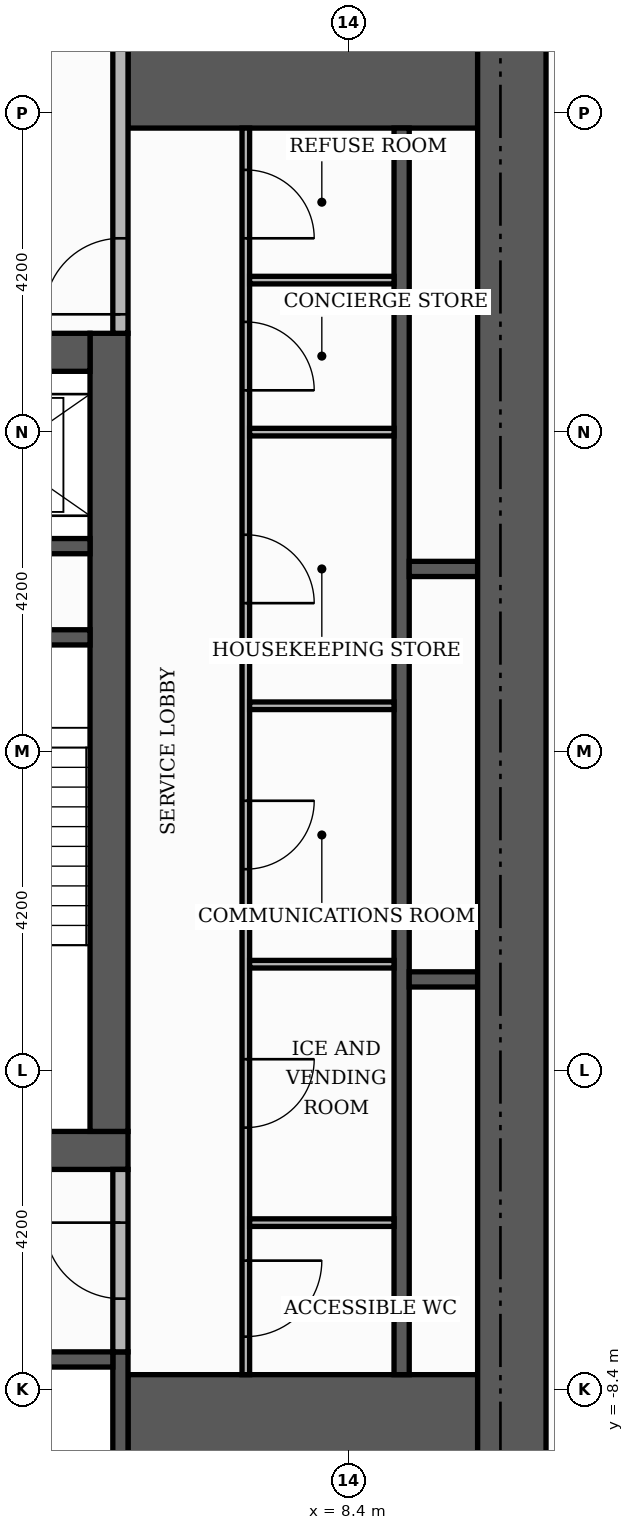
"""IFC4 building model, lengths in metres.
Left out: names, types, materials, properties, quantities, classifications, styles, units other than length and angle.
Written with IfcOpenShell. Run it as: python <this file> out.ifc"""

import sys

from ifc_helpers import new_model, si_unit, direction, frame, frame_2d, origin, place, context, subcontext, project, spatial, rectangle, extrude, element, fill, save


model = new_model("IFC4")
c1 = context("Model", 3, precision=1e-05, world=origin(), true_north=direction((0.0, 1.0)))
c2 = subcontext(c1, "Body", "Model", "MODEL_VIEW")
j1 = project(units=[si_unit("LENGTHUNIT", "METRE"), si_unit("PLANEANGLEUNIT", "RADIAN")], contexts=[c1])
p1 = place(None, origin())
s1 = spatial("IfcSite", under=j1, at=p1, CompositionType="ELEMENT")
p2 = place(p1, origin())
s2 = spatial("IfcBuilding", under=s1, at=p2, CompositionType="ELEMENT")
p3 = place(p2, frame((0.0, 0.0, 102.6)))
s3 = spatial("IfcBuildingStorey", under=s2, at=p3, CompositionType="ELEMENT", Elevation=102.6)
p4 = place(p3, frame((-5.5, -5.25, 0.0), z_axis=(0.0, 0.0, 1.0), x_axis=(1.0, 0.0, 0.0)))
e1 = element("IfcWall", 1, at=p4, inside=s3, PredefinedType="SHEAR", context=c2, shape_type="SweptSolid", body=[
    extrude(rectangle(XDim=11.0, YDim=0.5, at=frame_2d((5.5, 0.0))), origin(), (0.0, 0.0, 1.0), 3.48),
])
p5 = place(p4, frame((4.9, 0.0, 0.0)))
e2 = element("IfcOpeningElement", 2, at=p5, cuts=e1, PredefinedType="OPENING", context=c2, shape_type="SweptSolid", body=[
    extrude(rectangle(XDim=1.2, YDim=2.1, at=frame_2d((0.6, 1.05))), frame((0.0, 0.26, 0.0), z_axis=(0.0, -1.0, 0.0), x_axis=(1.0, 0.0, 0.0)), (0.0, 0.0, 1.0), 0.52),
])
p6 = place(p3, frame((5.25, -5.0, 0.0), z_axis=(0.0, 0.0, 1.0), x_axis=(0.0, 1.0, 0.0)))
e3 = element("IfcWall", 3, at=p6, inside=s3, PredefinedType="SHEAR", context=c2, shape_type="SweptSolid", body=[
    extrude(rectangle(XDim=10.5, YDim=0.5, at=frame_2d((5.25, 0.0))), origin(), (0.0, 0.0, 1.0), 3.48),
])
p7 = place(p3, frame((-5.0, 5.25, 0.0), z_axis=(0.0, 0.0, 1.0), x_axis=(1.0, 0.0, 0.0)))
e4 = element("IfcWall", 4, at=p7, inside=s3, PredefinedType="SHEAR", context=c2, shape_type="SweptSolid", body=[
    extrude(rectangle(XDim=10.0, YDim=0.5, at=frame_2d((5.0, 0.0))), origin(), (0.0, 0.0, 1.0), 3.48),
])
p8 = place(p7, frame((4.4, 0.0, 0.0)))
e5 = element("IfcOpeningElement", 5, at=p8, cuts=e4, PredefinedType="OPENING", context=c2, shape_type="SweptSolid", body=[
    extrude(rectangle(XDim=1.2, YDim=2.1, at=frame_2d((0.6, 1.05))), frame((0.0, 0.26, 0.0), z_axis=(0.0, -1.0, 0.0), x_axis=(1.0, 0.0, 0.0)), (0.0, 0.0, 1.0), 0.52),
])
for number, where, z_axis, x_axis in (
    (6, (5.5, -9.15, 0.0), (0.0, 0.0, 1.0), (1.0, 0.0, 0.0)),
    (7, (5.5, 9.15, 0.0), (0.0, 0.0, 1.0), (1.0, 0.0, 0.0)),
):
    element("IfcWall", number, at=place(p3, frame(where, z_axis=z_axis, x_axis=x_axis)), inside=s3, PredefinedType="SHEAR", context=c2, shape_type="SweptSolid", body=[
        extrude(rectangle(XDim=4.6, YDim=1.9, at=frame_2d((2.3, 0.0))), origin(), (0.0, 0.0, 1.0), 3.48),
    ])
p9 = place(p3, frame((2.15, 1.5, 0.0), z_axis=(0.0, 0.0, 1.0), x_axis=(1.0, 0.0, 0.0)))
e8 = element("IfcWall", 8, at=p9, inside=s3, PredefinedType="SHEAR", context=c2, shape_type="SweptSolid", body=[
    extrude(rectangle(XDim=2.85, YDim=0.2, at=frame_2d((1.425, 0.0))), origin(), (0.0, 0.0, 1.0), 3.48),
])
p10 = place(p3, frame((5.4, -10.1, 0.0), z_axis=(0.0, 0.0, 1.0), x_axis=(0.0, 1.0, 0.0)))
e9 = element("IfcWall", 9, at=p10, inside=s3, PredefinedType="SHEAR", context=c2, shape_type="SweptSolid", body=[
    extrude(rectangle(XDim=2.2, YDim=0.2, at=frame_2d((1.1, 0.0))), origin(), (0.0, 0.0, 1.0), 3.48),
])
p11 = place(p3, frame((9.1, -8.2, 0.0), z_axis=(0.0, 0.0, 1.0), x_axis=(0.0, 1.0, 0.0)))
e10 = element("IfcWall", 10, at=p11, inside=s3, PredefinedType="SHEAR", context=c2, shape_type="SweptSolid", body=[
    extrude(rectangle(XDim=16.4, YDim=0.2, at=frame_2d((8.2, 0.0))), origin(), (0.0, 0.0, 1.0), 3.48),
])
p12 = place(p3, frame((2.8, -8.0, 0.0), z_axis=(0.0, 0.0, 1.0), x_axis=(1.0, 0.0, 0.0)))
e11 = element("IfcWall", 11, at=p12, inside=s3, PredefinedType="SHEAR", context=c2, shape_type="SweptSolid", body=[
    extrude(rectangle(XDim=2.5, YDim=0.2, at=frame_2d((1.25, 0.0))), origin(), (0.0, 0.0, 1.0), 3.48),
])
for number, where, z_axis, x_axis in (
    (12, (9.2, -3.0, 0.0), (0.0, 0.0, 1.0), (1.0, 0.0, 0.0)),
    (13, (9.2, 2.4, 0.0), (0.0, 0.0, 1.0), (1.0, 0.0, 0.0)),
):
    element("IfcWall", number, at=place(p3, frame(where, z_axis=z_axis, x_axis=x_axis)), inside=s3, PredefinedType="SHEAR", context=c2, shape_type="SweptSolid", body=[
        extrude(rectangle(XDim=0.9, YDim=0.2, at=frame_2d((0.45, 0.0))), origin(), (0.0, 0.0, 1.0), 3.48),
    ])
p13 = place(p3, frame((2.15, 2.7, 0.0), z_axis=(0.0, 0.0, 1.0), x_axis=(1.0, 0.0, 0.0)))
e14 = element("IfcWall", 14, at=p13, inside=s3, PredefinedType="SHEAR", context=c2, shape_type="SweptSolid", body=[
    extrude(rectangle(XDim=2.85, YDim=0.2, at=frame_2d((1.425, 0.0))), origin(), (0.0, 0.0, 1.0), 3.48),
])
p14 = place(p3, frame((10.55, -10.1, 0.0), z_axis=(0.0, 0.0, 1.0), x_axis=(0.0, 1.0, 0.0)))
e15 = element("IfcWall", 15, at=p14, inside=s3, PredefinedType="SHEAR", context=c2, shape_type="SweptSolid", body=[
    extrude(rectangle(XDim=20.2, YDim=0.9, at=frame_2d((10.1, 0.0))), origin(), (0.0, 0.0, 1.0), 3.48),
])
p15 = place(p3, frame((7.05, -8.2, 0.0), z_axis=(0.0, 0.0, 1.0), x_axis=(0.0, 1.0, 0.0)))
e16 = element("IfcWall", 16, at=p15, inside=s3, PredefinedType="PARTITIONING", context=c2, shape_type="SweptSolid", body=[
    extrude(rectangle(XDim=16.4, YDim=0.1, at=frame_2d((8.2, 0.0))), origin(), (0.0, 0.0, 1.0), 3.48),
])
p16 = place(p15, frame((0.5, 0.0, 0.0)))
e17 = element("IfcOpeningElement", 17, at=p16, cuts=e16, PredefinedType="OPENING", context=c2, shape_type="SweptSolid", body=[
    extrude(rectangle(XDim=1.0, YDim=2.1, at=frame_2d((0.5, 1.05))), frame((0.0, 0.06, 0.0), z_axis=(0.0, -1.0, 0.0), x_axis=(1.0, 0.0, 0.0)), (0.0, 0.0, 1.0), 0.12),
])
p17 = place(p15, frame((3.25, 0.0, 0.0)))
e18 = element("IfcOpeningElement", 18, at=p17, cuts=e16, PredefinedType="OPENING", context=c2, shape_type="SweptSolid", body=[
    extrude(rectangle(XDim=0.9, YDim=2.1, at=frame_2d((0.45, 1.05))), frame((0.0, 0.06, 0.0), z_axis=(0.0, -1.0, 0.0), x_axis=(1.0, 0.0, 0.0)), (0.0, 0.0, 1.0), 0.12),
])
p18 = place(p15, frame((6.65, 0.0, 0.0)))
e19 = element("IfcOpeningElement", 19, at=p18, cuts=e16, PredefinedType="OPENING", context=c2, shape_type="SweptSolid", body=[
    extrude(rectangle(XDim=0.9, YDim=2.1, at=frame_2d((0.45, 1.05))), frame((0.0, 0.06, 0.0), z_axis=(0.0, -1.0, 0.0), x_axis=(1.0, 0.0, 0.0)), (0.0, 0.0, 1.0), 0.12),
])
p19 = place(p15, frame((10.15, 0.0, 0.0)))
e20 = element("IfcOpeningElement", 20, at=p19, cuts=e16, PredefinedType="OPENING", context=c2, shape_type="SweptSolid", body=[
    extrude(rectangle(XDim=0.9, YDim=2.1, at=frame_2d((0.45, 1.05))), frame((0.0, 0.06, 0.0), z_axis=(0.0, -1.0, 0.0), x_axis=(1.0, 0.0, 0.0)), (0.0, 0.0, 1.0), 0.12),
])
p20 = place(p15, frame((12.95, 0.0, 0.0)))
e21 = element("IfcOpeningElement", 21, at=p20, cuts=e16, PredefinedType="OPENING", context=c2, shape_type="SweptSolid", body=[
    extrude(rectangle(XDim=0.9, YDim=2.1, at=frame_2d((0.45, 1.05))), frame((0.0, 0.06, 0.0), z_axis=(0.0, -1.0, 0.0), x_axis=(1.0, 0.0, 0.0)), (0.0, 0.0, 1.0), 0.12),
])
p21 = place(p15, frame((14.95, 0.0, 0.0)))
e22 = element("IfcOpeningElement", 22, at=p21, cuts=e16, PredefinedType="OPENING", context=c2, shape_type="SweptSolid", body=[
    extrude(rectangle(XDim=0.9, YDim=2.1, at=frame_2d((0.45, 1.05))), frame((0.0, 0.06, 0.0), z_axis=(0.0, -1.0, 0.0), x_axis=(1.0, 0.0, 0.0)), (0.0, 0.0, 1.0), 0.12),
])
p22 = place(p3, frame((5.4, -7.9, 0.0), z_axis=(0.0, 0.0, 1.0), x_axis=(0.0, 1.0, 0.0)))
e23 = element("IfcWall", 23, at=p22, inside=s3, PredefinedType="PARTITIONING", context=c2, shape_type="SweptSolid", body=[
    extrude(rectangle(XDim=2.4, YDim=0.2, at=frame_2d((1.2, 0.0))), origin(), (0.0, 0.0, 1.0), 3.48),
])
p23 = place(p22, frame((0.7, 0.0, 0.0)))
e24 = element("IfcOpeningElement", 24, at=p23, cuts=e23, PredefinedType="OPENING", context=c2, shape_type="SweptSolid", body=[
    extrude(rectangle(XDim=1.0, YDim=2.1, at=frame_2d((0.5, 1.05))), frame((0.0, 0.11, 0.0), z_axis=(0.0, -1.0, 0.0), x_axis=(1.0, 0.0, 0.0)), (0.0, 0.0, 1.0), 0.22),
])
for number, where, z_axis, x_axis in (
    (25, (7.1, -6.2, 0.0), (0.0, 0.0, 1.0), (1.0, 0.0, 0.0)),
    (26, (7.1, -2.8, 0.0), (0.0, 0.0, 1.0), (1.0, 0.0, 0.0)),
    (27, (7.1, 0.6, 0.0), (0.0, 0.0, 1.0), (1.0, 0.0, 0.0)),
    (28, (7.1, 4.2, 0.0), (0.0, 0.0, 1.0), (1.0, 0.0, 0.0)),
):
    element("IfcWall", number, at=place(p3, frame(where, z_axis=z_axis, x_axis=x_axis)), inside=s3, PredefinedType="PARTITIONING", context=c2, shape_type="SweptSolid", body=[
        extrude(rectangle(XDim=1.9, YDim=0.1, at=frame_2d((0.95, 0.0))), origin(), (0.0, 0.0, 1.0), 3.48),
    ])
p24 = place(p3, frame((5.4, 5.5, 0.0), z_axis=(0.0, 0.0, 1.0), x_axis=(0.0, 1.0, 0.0)))
e29 = element("IfcWall", 29, at=p24, inside=s3, PredefinedType="PARTITIONING", context=c2, shape_type="SweptSolid", body=[
    extrude(rectangle(XDim=4.6, YDim=0.2, at=frame_2d((2.3, 0.0))), origin(), (0.0, 0.0, 1.0), 3.48),
])
p25 = place(p24, frame((0.25, 0.0, 0.0)))
e30 = element("IfcOpeningElement", 30, at=p25, cuts=e29, PredefinedType="OPENING", context=c2, shape_type="SweptSolid", body=[
    extrude(rectangle(XDim=1.0, YDim=2.1, at=frame_2d((0.5, 1.05))), frame((0.0, 0.11, 0.0), z_axis=(0.0, -1.0, 0.0), x_axis=(1.0, 0.0, 0.0)), (0.0, 0.0, 1.0), 0.22),
])
p26 = place(p3, frame((7.1, 6.2, 0.0), z_axis=(0.0, 0.0, 1.0), x_axis=(1.0, 0.0, 0.0)))
e31 = element("IfcWall", 31, at=p26, inside=s3, PredefinedType="PARTITIONING", context=c2, shape_type="SweptSolid", body=[
    extrude(rectangle(XDim=1.9, YDim=0.1, at=frame_2d((0.95, 0.0))), origin(), (0.0, 0.0, 1.0), 3.48),
])
p27 = place(p25, origin())
e32 = element("IfcDoor", 32, at=p27, inside=s3, OperationType="SINGLE_SWING_LEFT", PredefinedType="DOOR", context=c2, shape_type="SweptSolid", body=[
    extrude(rectangle(XDim=1.0, YDim=2.1, at=frame_2d((0.5, 1.05))), frame((0.0, 0.025, 0.0), z_axis=(0.0, -1.0, 0.0), x_axis=(1.0, 0.0, 0.0)), (0.0, 0.0, 1.0), 0.05),
])
fill(e30, e32)
p28 = place(p23, origin())
e33 = element("IfcDoor", 33, at=p28, inside=s3, OperationType="SINGLE_SWING_RIGHT", PredefinedType="DOOR", context=c2, shape_type="SweptSolid", body=[
    extrude(rectangle(XDim=1.0, YDim=2.1, at=frame_2d((0.5, 1.05))), frame((0.0, 0.025, 0.0), z_axis=(0.0, -1.0, 0.0), x_axis=(1.0, 0.0, 0.0)), (0.0, 0.0, 1.0), 0.05),
])
fill(e24, e33)
p29 = place(p16, frame((1.0, 0.0, 0.0), z_axis=(0.0, 0.0, 1.0), x_axis=(-1.0, 0.0, 0.0)))
e34 = element("IfcDoor", 34, at=p29, inside=s3, OperationType="SINGLE_SWING_RIGHT", PredefinedType="DOOR", context=c2, shape_type="SweptSolid", body=[
    extrude(rectangle(XDim=1.0, YDim=2.1, at=frame_2d((0.5, 1.05))), frame((0.0, 0.025, 0.0), z_axis=(0.0, -1.0, 0.0), x_axis=(1.0, 0.0, 0.0)), (0.0, 0.0, 1.0), 0.05),
])
fill(e17, e34)
p30 = place(p17, frame((0.9, 0.0, 0.0), z_axis=(0.0, 0.0, 1.0), x_axis=(-1.0, 0.0, 0.0)))
e35 = element("IfcDoor", 35, at=p30, inside=s3, OperationType="SINGLE_SWING_RIGHT", PredefinedType="DOOR", context=c2, shape_type="SweptSolid", body=[
    extrude(rectangle(XDim=0.9, YDim=2.1, at=frame_2d((0.45, 1.05))), frame((0.0, 0.025, 0.0), z_axis=(0.0, -1.0, 0.0), x_axis=(1.0, 0.0, 0.0)), (0.0, 0.0, 1.0), 0.05),
])
fill(e18, e35)
p31 = place(p18, frame((0.9, 0.0, 0.0), z_axis=(0.0, 0.0, 1.0), x_axis=(-1.0, 0.0, 0.0)))
e36 = element("IfcDoor", 36, at=p31, inside=s3, OperationType="SINGLE_SWING_RIGHT", PredefinedType="DOOR", context=c2, shape_type="SweptSolid", body=[
    extrude(rectangle(XDim=0.9, YDim=2.1, at=frame_2d((0.45, 1.05))), frame((0.0, 0.025, 0.0), z_axis=(0.0, -1.0, 0.0), x_axis=(1.0, 0.0, 0.0)), (0.0, 0.0, 1.0), 0.05),
])
fill(e19, e36)
p32 = place(p19, frame((0.9, 0.0, 0.0), z_axis=(0.0, 0.0, 1.0), x_axis=(-1.0, 0.0, 0.0)))
e37 = element("IfcDoor", 37, at=p32, inside=s3, OperationType="SINGLE_SWING_LEFT", PredefinedType="DOOR", context=c2, shape_type="SweptSolid", body=[
    extrude(rectangle(XDim=0.9, YDim=2.1, at=frame_2d((0.45, 1.05))), frame((0.0, 0.025, 0.0), z_axis=(0.0, -1.0, 0.0), x_axis=(1.0, 0.0, 0.0)), (0.0, 0.0, 1.0), 0.05),
])
fill(e20, e37)
p33 = place(p20, frame((0.9, 0.0, 0.0), z_axis=(0.0, 0.0, 1.0), x_axis=(-1.0, 0.0, 0.0)))
e38 = element("IfcDoor", 38, at=p33, inside=s3, OperationType="SINGLE_SWING_LEFT", PredefinedType="DOOR", context=c2, shape_type="SweptSolid", body=[
    extrude(rectangle(XDim=0.9, YDim=2.1, at=frame_2d((0.45, 1.05))), frame((0.0, 0.025, 0.0), z_axis=(0.0, -1.0, 0.0), x_axis=(1.0, 0.0, 0.0)), (0.0, 0.0, 1.0), 0.05),
])
fill(e21, e38)
p34 = place(p21, frame((0.9, 0.0, 0.0), z_axis=(0.0, 0.0, 1.0), x_axis=(-1.0, 0.0, 0.0)))
e39 = element("IfcDoor", 39, at=p34, inside=s3, OperationType="SINGLE_SWING_LEFT", PredefinedType="DOOR", context=c2, shape_type="SweptSolid", body=[
    extrude(rectangle(XDim=0.9, YDim=2.1, at=frame_2d((0.45, 1.05))), frame((0.0, 0.025, 0.0), z_axis=(0.0, -1.0, 0.0), x_axis=(1.0, 0.0, 0.0)), (0.0, 0.0, 1.0), 0.05),
])
fill(e22, e39)
save(model, sys.argv[1])
